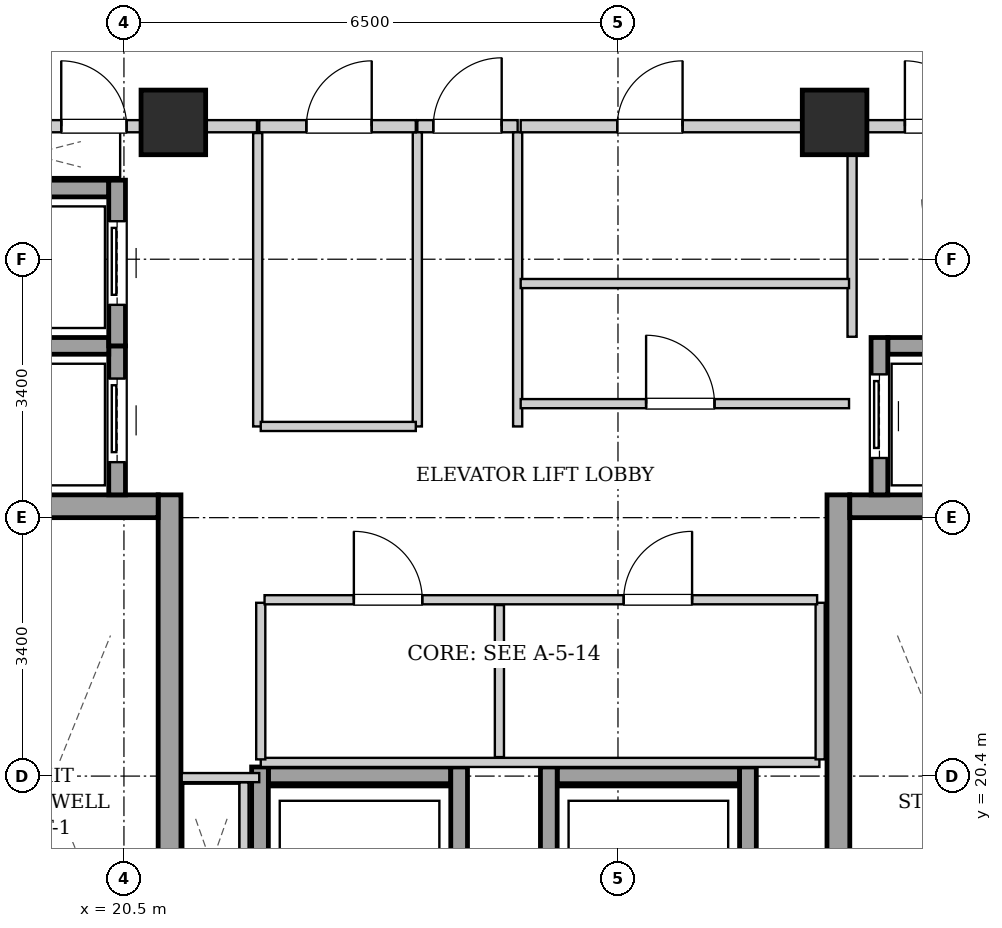
"""IFC4 building model, lengths in metres.
Left out: names, types, materials, properties, quantities, classifications, styles, units other than length and angle.
Written with IfcOpenShell. Run it as: python <this file> out.ifc"""

import sys

from ifc_helpers import new_model, si_unit, direction, frame, frame_2d, origin, origin_2d, place, context, subcontext, project, spatial, rectangle, extrude, element, fill, save


model = new_model("IFC4")
c1 = context("Model", 3, precision=1e-05, world=origin(), true_north=direction((0.0, 1.0)))
c2 = subcontext(c1, "Body", "Model", "MODEL_VIEW")
j1 = project(units=[si_unit("LENGTHUNIT", "METRE"), si_unit("PLANEANGLEUNIT", "RADIAN")], contexts=[c1])
p1 = place(None, origin())
s1 = spatial("IfcSite", under=j1, at=p1, CompositionType="ELEMENT")
p2 = place(p1, origin())
s2 = spatial("IfcBuilding", under=s1, at=p2, CompositionType="ELEMENT")
p3 = place(p2, frame((0.0, 0.0, 214.0)))
s3 = spatial("IfcBuildingStorey", under=s2, at=p3, CompositionType="ELEMENT", Elevation=214.0)
for number, where, z_axis, x_axis in (
    (1, (21.15, 29.0, 0.0), (0.0, 0.0, 1.0), (1.0, 0.0, 0.0)),
    (2, (29.85, 29.0, 0.0), (0.0, 0.0, 1.0), (1.0, 0.0, 0.0)),
):
    element("IfcColumn", number, at=place(p3, frame(where, z_axis=z_axis, x_axis=x_axis)), inside=s3, PredefinedType="COLUMN", context=c2, shape_type="SweptSolid", body=[
        extrude(rectangle(XDim=0.85, YDim=0.85, at=origin_2d()), origin(), (0.0, 0.0, 1.0), 3.3),
    ])
p4 = place(p3, frame((21.1, 15.1, 0.0), z_axis=(0.0, 0.0, 1.0), x_axis=(0.0, 1.0, 0.0)))
e3 = element("IfcWall", 3, at=p4, inside=s3, PredefinedType="SHEAR", context=c2, shape_type="SweptSolid", body=[
    extrude(rectangle(XDim=9.0, YDim=0.3, at=frame_2d((4.5, 0.0))), origin(), (0.0, 0.0, 1.0), 3.04),
])
p5 = place(p3, frame((18.1, 23.95, 0.0), z_axis=(0.0, 0.0, 1.0), x_axis=(1.0, 0.0, 0.0)))
e4 = element("IfcWall", 4, at=p5, inside=s3, PredefinedType="SHEAR", context=c2, shape_type="SweptSolid", body=[
    extrude(rectangle(XDim=2.85, YDim=0.3, at=frame_2d((1.425, 0.0))), origin(), (0.0, 0.0, 1.0), 3.04),
])
p6 = place(p3, frame((29.9, 15.1, 0.0), z_axis=(0.0, 0.0, 1.0), x_axis=(0.0, 1.0, 0.0)))
e5 = element("IfcWall", 5, at=p6, inside=s3, PredefinedType="SHEAR", context=c2, shape_type="SweptSolid", body=[
    extrude(rectangle(XDim=9.0, YDim=0.3, at=frame_2d((4.5, 0.0))), origin(), (0.0, 0.0, 1.0), 3.04),
])
p7 = place(p3, frame((30.05, 23.95, 0.0), z_axis=(0.0, 0.0, 1.0), x_axis=(1.0, 0.0, 0.0)))
e6 = element("IfcWall", 6, at=p7, inside=s3, PredefinedType="SHEAR", context=c2, shape_type="SweptSolid", body=[
    extrude(rectangle(XDim=2.85, YDim=0.3, at=frame_2d((1.425, 0.0))), origin(), (0.0, 0.0, 1.0), 3.04),
])
p8 = place(p3, frame((20.41, 24.1, 0.0), z_axis=(0.0, 0.0, 1.0), x_axis=(0.0, 1.0, 0.0)))
e7 = element("IfcWall", 7, at=p8, inside=s3, PredefinedType="SHEAR", context=c2, shape_type="SweptSolid", body=[
    extrude(rectangle(XDim=1.96, YDim=0.22, at=frame_2d((0.98, 0.0))), origin(), (0.0, 0.0, 1.0), 3.04),
])
p9 = place(p8, frame((0.43, 0.0, 0.0)))
e8 = element("IfcOpeningElement", 8, at=p9, cuts=e7, PredefinedType="OPENING", context=c2, shape_type="SweptSolid", body=[
    extrude(rectangle(XDim=1.1, YDim=2.15, at=frame_2d((0.55, 1.075))), frame((0.0, 0.12, 0.0), z_axis=(0.0, -1.0, 0.0), x_axis=(1.0, 0.0, 0.0)), (0.0, 0.0, 1.0), 0.24),
])
for number, where, z_axis, x_axis in (
    (9, (18.4, 26.06, 0.0), (0.0, 0.0, 1.0), (1.0, 0.0, 0.0)),
    (10, (18.4, 28.13, 0.0), (0.0, 0.0, 1.0), (1.0, 0.0, 0.0)),
):
    element("IfcWall", number, at=place(p3, frame(where, z_axis=z_axis, x_axis=x_axis)), inside=s3, PredefinedType="SHEAR", context=c2, shape_type="SweptSolid", body=[
        extrude(rectangle(XDim=1.9, YDim=0.22, at=frame_2d((0.95, 0.0))), origin(), (0.0, 0.0, 1.0), 3.04),
    ])
p10 = place(p3, frame((20.41, 26.06, 0.0), z_axis=(0.0, 0.0, 1.0), x_axis=(0.0, 1.0, 0.0)))
e11 = element("IfcWall", 11, at=p10, inside=s3, PredefinedType="SHEAR", context=c2, shape_type="SweptSolid", body=[
    extrude(rectangle(XDim=2.18, YDim=0.22, at=frame_2d((1.09, 0.0))), origin(), (0.0, 0.0, 1.0), 3.04),
])
p11 = place(p10, frame((0.54, 0.0, 0.0)))
e12 = element("IfcOpeningElement", 12, at=p11, cuts=e11, PredefinedType="OPENING", context=c2, shape_type="SweptSolid", body=[
    extrude(rectangle(XDim=1.1, YDim=2.15, at=frame_2d((0.55, 1.075))), frame((0.0, 0.12, 0.0), z_axis=(0.0, -1.0, 0.0), x_axis=(1.0, 0.0, 0.0)), (0.0, 0.0, 1.0), 0.24),
])
p12 = place(p3, frame((30.55, 26.06, 0.0), z_axis=(0.0, 0.0, 1.0), x_axis=(1.0, 0.0, 0.0)))
e13 = element("IfcWall", 13, at=p12, inside=s3, PredefinedType="SHEAR", context=c2, shape_type="SweptSolid", body=[
    extrude(rectangle(XDim=1.9, YDim=0.22, at=frame_2d((0.95, 0.0))), origin(), (0.0, 0.0, 1.0), 3.04),
])
p13 = place(p3, frame((30.44, 24.1, 0.0), z_axis=(0.0, 0.0, 1.0), x_axis=(0.0, 1.0, 0.0)))
e14 = element("IfcWall", 14, at=p13, inside=s3, PredefinedType="SHEAR", context=c2, shape_type="SweptSolid", body=[
    extrude(rectangle(XDim=2.07, YDim=0.22, at=frame_2d((1.035, 0.0))), origin(), (0.0, 0.0, 1.0), 3.04),
])
p14 = place(p13, frame((0.485, 0.0, 0.0)))
e15 = element("IfcOpeningElement", 15, at=p14, cuts=e14, PredefinedType="OPENING", context=c2, shape_type="SweptSolid", body=[
    extrude(rectangle(XDim=1.1, YDim=2.15, at=frame_2d((0.55, 1.075))), frame((0.0, 0.12, 0.0), z_axis=(0.0, -1.0, 0.0), x_axis=(1.0, 0.0, 0.0)), (0.0, 0.0, 1.0), 0.24),
])
p15 = place(p3, frame((22.4, 20.41, 0.0), z_axis=(0.0, 0.0, 1.0), x_axis=(1.0, 0.0, 0.0)))
e16 = element("IfcWall", 16, at=p15, inside=s3, PredefinedType="SHEAR", context=c2, shape_type="SweptSolid", body=[
    extrude(rectangle(XDim=2.4, YDim=0.22, at=frame_2d((1.2, 0.0))), origin(), (0.0, 0.0, 1.0), 3.04),
])
for number, where, z_axis, x_axis in (
    (17, (22.29, 17.98, 0.0), (0.0, 0.0, 1.0), (0.0, 1.0, 0.0)),
    (18, (24.91, 17.98, 0.0), (0.0, 0.0, 1.0), (0.0, 1.0, 0.0)),
):
    element("IfcWall", number, at=place(p3, frame(where, z_axis=z_axis, x_axis=x_axis)), inside=s3, PredefinedType="SHEAR", context=c2, shape_type="SweptSolid", body=[
        extrude(rectangle(XDim=2.54, YDim=0.22, at=frame_2d((1.27, 0.0))), origin(), (0.0, 0.0, 1.0), 3.04),
    ])
p16 = place(p3, frame((26.2, 20.41, 0.0), z_axis=(0.0, 0.0, 1.0), x_axis=(1.0, 0.0, 0.0)))
e19 = element("IfcWall", 19, at=p16, inside=s3, PredefinedType="SHEAR", context=c2, shape_type="SweptSolid", body=[
    extrude(rectangle(XDim=2.4, YDim=0.22, at=frame_2d((1.2, 0.0))), origin(), (0.0, 0.0, 1.0), 3.04),
])
for number, where, z_axis, x_axis in (
    (20, (26.09, 17.98, 0.0), (0.0, 0.0, 1.0), (0.0, 1.0, 0.0)),
    (21, (28.71, 17.98, 0.0), (0.0, 0.0, 1.0), (0.0, 1.0, 0.0)),
):
    element("IfcWall", number, at=place(p3, frame(where, z_axis=z_axis, x_axis=x_axis)), inside=s3, PredefinedType="SHEAR", context=c2, shape_type="SweptSolid", body=[
        extrude(rectangle(XDim=2.54, YDim=0.22, at=frame_2d((1.27, 0.0))), origin(), (0.0, 0.0, 1.0), 3.04),
    ])
p17 = place(p3, frame((24.36, 28.95, 0.0), z_axis=(0.0, 0.0, 1.0), x_axis=(1.0, 0.0, 0.0)))
e22 = element("IfcWall", 22, at=p17, inside=s3, PredefinedType="PARTITIONING", context=c2, shape_type="SweptSolid", body=[
    extrude(rectangle(XDim=1.32, YDim=0.16, at=frame_2d((0.66, 0.0))), origin(), (0.0, 0.0, 1.0), 2.556),
])
p18 = place(p17, frame((0.21, 0.0, 0.0)))
e23 = element("IfcOpeningElement", 23, at=p18, cuts=e22, PredefinedType="OPENING", context=c2, shape_type="SweptSolid", body=[
    extrude(rectangle(XDim=0.9, YDim=2.05, at=frame_2d((0.45, 1.025))), frame((0.0, 0.09, 0.0), z_axis=(0.0, -1.0, 0.0), x_axis=(1.0, 0.0, 0.0)), (0.0, 0.0, 1.0), 0.18),
])
p19 = place(p3, frame((17.96, 28.95, 0.0), z_axis=(0.0, 0.0, 1.0), x_axis=(1.0, 0.0, 0.0)))
e24 = element("IfcWall", 24, at=p19, inside=s3, PredefinedType="PARTITIONING", context=c2, shape_type="SweptSolid", body=[
    extrude(rectangle(XDim=4.29, YDim=0.16, at=frame_2d((2.145, 0.0))), origin(), (0.0, 0.0, 1.0), 2.556),
])
p20 = place(p19, frame((1.715, 0.0, 0.0)))
e25 = element("IfcOpeningElement", 25, at=p20, cuts=e24, PredefinedType="OPENING", context=c2, shape_type="SweptSolid", body=[
    extrude(rectangle(XDim=0.86, YDim=2.05, at=frame_2d((0.43, 1.025))), frame((0.0, 0.09, 0.0), z_axis=(0.0, -1.0, 0.0), x_axis=(1.0, 0.0, 0.0)), (0.0, 0.0, 1.0), 0.18),
])
p21 = place(p3, frame((22.08, 18.2, 0.0), z_axis=(0.0, 0.0, 1.0), x_axis=(0.0, 1.0, 0.0)))
e26 = element("IfcWall", 26, at=p21, inside=s3, PredefinedType="PARTITIONING", context=c2, shape_type="SweptSolid", body=[
    extrude(rectangle(XDim=2.12, YDim=0.12, at=frame_2d((1.06, 0.0))), origin(), (0.0, 0.0, 1.0), 3.04),
])
p22 = place(p3, frame((22.28, 20.38, 0.0), z_axis=(0.0, 0.0, 1.0), x_axis=(-1.0, 0.0, 0.0)))
e27 = element("IfcWall", 27, at=p22, inside=s3, PredefinedType="PARTITIONING", context=c2, shape_type="SweptSolid", body=[
    extrude(rectangle(XDim=1.02, YDim=0.12, at=frame_2d((0.51, 0.0))), origin(), (0.0, 0.0, 1.0), 3.04),
])
for number, where, z_axis, x_axis in (
    (28, (24.36, 25.0, 0.0), (0.0, 0.0, 1.0), (0.0, 1.0, 0.0)),
    (29, (25.68, 25.0, 0.0), (0.0, 0.0, 1.0), (0.0, 1.0, 0.0)),
):
    element("IfcWall", number, at=place(p3, frame(where, z_axis=z_axis, x_axis=x_axis)), inside=s3, PredefinedType="PARTITIONING", context=c2, shape_type="SweptSolid", body=[
        extrude(rectangle(XDim=3.87, YDim=0.12, at=frame_2d((1.935, 0.0))), origin(), (0.0, 0.0, 1.0), 3.04),
    ])
p23 = place(p3, frame((30.08, 26.18, 0.0), z_axis=(0.0, 0.0, 1.0), x_axis=(0.0, 1.0, 0.0)))
e30 = element("IfcWall", 30, at=p23, inside=s3, PredefinedType="PARTITIONING", context=c2, shape_type="SweptSolid", body=[
    extrude(rectangle(XDim=2.68, YDim=0.12, at=frame_2d((1.34, 0.0))), origin(), (0.0, 0.0, 1.0), 3.04),
])
p24 = place(p3, frame((30.08, 28.95, 0.0), z_axis=(0.0, 0.0, 1.0), x_axis=(1.0, 0.0, 0.0)))
e31 = element("IfcWall", 31, at=p24, inside=s3, PredefinedType="PARTITIONING", context=c2, shape_type="SweptSolid", body=[
    extrude(rectangle(XDim=2.96, YDim=0.16, at=frame_2d((1.48, 0.0))), origin(), (0.0, 0.0, 1.0), 3.04),
])
p25 = place(p24, frame((0.695, 0.0, 0.0)))
e32 = element("IfcOpeningElement", 32, at=p25, cuts=e31, PredefinedType="OPENING", context=c2, shape_type="SweptSolid", body=[
    extrude(rectangle(XDim=0.86, YDim=2.05, at=frame_2d((0.43, 1.025))), frame((0.0, 0.09, 0.0), z_axis=(0.0, -1.0, 0.0), x_axis=(1.0, 0.0, 0.0)), (0.0, 0.0, 1.0), 0.18),
])
p26 = place(p3, frame((22.26, 25.0, 0.0), z_axis=(0.0, 0.0, 1.0), x_axis=(0.0, 1.0, 0.0)))
e33 = element("IfcWall", 33, at=p26, inside=s3, PredefinedType="PARTITIONING", context=c2, shape_type="SweptSolid", body=[
    extrude(rectangle(XDim=3.86, YDim=0.12, at=frame_2d((1.93, 0.0))), origin(), (0.0, 0.0, 1.0), 3.04),
])
p27 = place(p3, frame((22.3, 25.0, 0.0), z_axis=(0.0, 0.0, 1.0), x_axis=(1.0, 0.0, 0.0)))
e34 = element("IfcWall", 34, at=p27, inside=s3, PredefinedType="PARTITIONING", context=c2, shape_type="SweptSolid", body=[
    extrude(rectangle(XDim=2.04, YDim=0.12, at=frame_2d((1.02, 0.0))), origin(), (0.0, 0.0, 1.0), 3.04),
])
p28 = place(p3, frame((22.28, 28.95, 0.0), z_axis=(0.0, 0.0, 1.0), x_axis=(1.0, 0.0, 0.0)))
e35 = element("IfcWall", 35, at=p28, inside=s3, PredefinedType="PARTITIONING", context=c2, shape_type="SweptSolid", body=[
    extrude(rectangle(XDim=2.06, YDim=0.16, at=frame_2d((1.03, 0.0))), origin(), (0.0, 0.0, 1.0), 2.556),
])
p29 = place(p28, frame((0.62, 0.0, 0.0)))
e36 = element("IfcOpeningElement", 36, at=p29, cuts=e35, PredefinedType="OPENING", context=c2, shape_type="SweptSolid", body=[
    extrude(rectangle(XDim=0.86, YDim=2.05, at=frame_2d((0.43, 1.025))), frame((0.0, 0.09, 0.0), z_axis=(0.0, -1.0, 0.0), x_axis=(1.0, 0.0, 0.0)), (0.0, 0.0, 1.0), 0.18),
])
p30 = place(p3, frame((25.72, 26.88, 0.0), z_axis=(0.0, 0.0, 1.0), x_axis=(1.0, 0.0, 0.0)))
e37 = element("IfcWall", 37, at=p30, inside=s3, PredefinedType="PARTITIONING", context=c2, shape_type="SweptSolid", body=[
    extrude(rectangle(XDim=4.32, YDim=0.12, at=frame_2d((2.16, 0.0))), origin(), (0.0, 0.0, 1.0), 3.04),
])
p31 = place(p3, frame((25.72, 25.3, 0.0), z_axis=(0.0, 0.0, 1.0), x_axis=(1.0, 0.0, 0.0)))
e38 = element("IfcWall", 38, at=p31, inside=s3, PredefinedType="PARTITIONING", context=c2, shape_type="SweptSolid", body=[
    extrude(rectangle(XDim=4.32, YDim=0.12, at=frame_2d((2.16, 0.0))), origin(), (0.0, 0.0, 1.0), 3.04),
])
p32 = place(p31, frame((1.65, 0.0, 0.0)))
e39 = element("IfcOpeningElement", 39, at=p32, cuts=e38, PredefinedType="OPENING", context=c2, shape_type="SweptSolid", body=[
    extrude(rectangle(XDim=0.9, YDim=2.05, at=frame_2d((0.45, 1.025))), frame((0.0, 0.07, 0.0), z_axis=(0.0, -1.0, 0.0), x_axis=(1.0, 0.0, 0.0)), (0.0, 0.0, 1.0), 0.14),
])
p33 = place(p3, frame((25.72, 28.95, 0.0), z_axis=(0.0, 0.0, 1.0), x_axis=(1.0, 0.0, 0.0)))
e40 = element("IfcWall", 40, at=p33, inside=s3, PredefinedType="PARTITIONING", context=c2, shape_type="SweptSolid", body=[
    extrude(rectangle(XDim=4.32, YDim=0.16, at=frame_2d((2.16, 0.0))), origin(), (0.0, 0.0, 1.0), 2.556),
])
p34 = place(p33, frame((1.27, 0.0, 0.0)))
e41 = element("IfcOpeningElement", 41, at=p34, cuts=e40, PredefinedType="OPENING", context=c2, shape_type="SweptSolid", body=[
    extrude(rectangle(XDim=0.86, YDim=2.05, at=frame_2d((0.43, 1.025))), frame((0.0, 0.09, 0.0), z_axis=(0.0, -1.0, 0.0), x_axis=(1.0, 0.0, 0.0)), (0.0, 0.0, 1.0), 0.18),
])
p35 = place(p3, frame((22.3, 20.58, 0.0), z_axis=(0.0, 0.0, 1.0), x_axis=(1.0, 0.0, 0.0)))
e42 = element("IfcWall", 42, at=p35, inside=s3, PredefinedType="PARTITIONING", context=c2, shape_type="SweptSolid", body=[
    extrude(rectangle(XDim=7.35, YDim=0.12, at=frame_2d((3.675, 0.0))), origin(), (0.0, 0.0, 1.0), 3.04),
])
for number, where, z_axis, x_axis in (
    (43, (22.3, 20.62, 0.0), (0.0, 0.0, 1.0), (0.0, 1.0, 0.0)),
    (44, (29.66, 20.62, 0.0), (0.0, 0.0, 1.0), (0.0, 1.0, 0.0)),
):
    element("IfcWall", number, at=place(p3, frame(where, z_axis=z_axis, x_axis=x_axis)), inside=s3, PredefinedType="PARTITIONING", context=c2, shape_type="SweptSolid", body=[
        extrude(rectangle(XDim=2.06, YDim=0.12, at=frame_2d((1.03, 0.0))), origin(), (0.0, 0.0, 1.0), 3.04),
    ])
p36 = place(p3, frame((25.44, 20.65, 0.0), z_axis=(0.0, 0.0, 1.0), x_axis=(0.0, 1.0, 0.0)))
e45 = element("IfcWall", 45, at=p36, inside=s3, PredefinedType="PARTITIONING", context=c2, shape_type="SweptSolid", body=[
    extrude(rectangle(XDim=2.0, YDim=0.12, at=frame_2d((1.0, 0.0))), origin(), (0.0, 0.0, 1.0), 3.04),
])
p37 = place(p3, frame((22.35, 22.72, 0.0), z_axis=(0.0, 0.0, 1.0), x_axis=(1.0, 0.0, 0.0)))
e46 = element("IfcWall", 46, at=p37, inside=s3, PredefinedType="PARTITIONING", context=c2, shape_type="SweptSolid", body=[
    extrude(rectangle(XDim=7.27, YDim=0.12, at=frame_2d((3.635, 0.0))), origin(), (0.0, 0.0, 1.0), 3.04),
])
p38 = place(p37, frame((1.175, 0.0, 0.0)))
e47 = element("IfcOpeningElement", 47, at=p38, cuts=e46, PredefinedType="OPENING", context=c2, shape_type="SweptSolid", body=[
    extrude(rectangle(XDim=0.9, YDim=2.05, at=frame_2d((0.45, 1.025))), frame((0.0, 0.07, 0.0), z_axis=(0.0, -1.0, 0.0), x_axis=(1.0, 0.0, 0.0)), (0.0, 0.0, 1.0), 0.14),
])
p39 = place(p37, frame((4.725, 0.0, 0.0)))
e48 = element("IfcOpeningElement", 48, at=p39, cuts=e46, PredefinedType="OPENING", context=c2, shape_type="SweptSolid", body=[
    extrude(rectangle(XDim=0.9, YDim=2.05, at=frame_2d((0.45, 1.025))), frame((0.0, 0.07, 0.0), z_axis=(0.0, -1.0, 0.0), x_axis=(1.0, 0.0, 0.0)), (0.0, 0.0, 1.0), 0.14),
])
p40 = place(p9, origin())
e49 = element("IfcDoor", 49, at=p40, inside=s3, OperationType="SLIDING_TO_LEFT", PredefinedType="DOOR", context=c2, shape_type="SweptSolid", body=[
    extrude(rectangle(XDim=1.1, YDim=2.15, at=frame_2d((0.55, 1.075))), frame((0.0, 0.025, 0.0), z_axis=(0.0, -1.0, 0.0), x_axis=(1.0, 0.0, 0.0)), (0.0, 0.0, 1.0), 0.05),
])
fill(e8, e49)
p41 = place(p11, origin())
e50 = element("IfcDoor", 50, at=p41, inside=s3, OperationType="SLIDING_TO_LEFT", PredefinedType="DOOR", context=c2, shape_type="SweptSolid", body=[
    extrude(rectangle(XDim=1.1, YDim=2.15, at=frame_2d((0.55, 1.075))), frame((0.0, 0.025, 0.0), z_axis=(0.0, -1.0, 0.0), x_axis=(1.0, 0.0, 0.0)), (0.0, 0.0, 1.0), 0.05),
])
fill(e12, e50)
p42 = place(p14, origin())
e51 = element("IfcDoor", 51, at=p42, inside=s3, OperationType="SLIDING_TO_LEFT", PredefinedType="DOOR", context=c2, shape_type="SweptSolid", body=[
    extrude(rectangle(XDim=1.1, YDim=2.15, at=frame_2d((0.55, 1.075))), frame((0.0, 0.025, 0.0), z_axis=(0.0, -1.0, 0.0), x_axis=(1.0, 0.0, 0.0)), (0.0, 0.0, 1.0), 0.05),
])
fill(e15, e51)
p43 = place(p18, origin())
e52 = element("IfcDoor", 52, at=p43, inside=s3, OperationType="SINGLE_SWING_RIGHT", PredefinedType="DOOR", context=c2, shape_type="SweptSolid", body=[
    extrude(rectangle(XDim=0.9, YDim=2.05, at=frame_2d((0.45, 1.025))), frame((0.0, 0.025, 0.0), z_axis=(0.0, -1.0, 0.0), x_axis=(1.0, 0.0, 0.0)), (0.0, 0.0, 1.0), 0.05),
])
fill(e23, e52)
p44 = place(p20, origin())
e53 = element("IfcDoor", 53, at=p44, inside=s3, OperationType="SINGLE_SWING_LEFT", PredefinedType="DOOR", context=c2, shape_type="SweptSolid", body=[
    extrude(rectangle(XDim=0.86, YDim=2.05, at=frame_2d((0.43, 1.025))), frame((0.0, 0.025, 0.0), z_axis=(0.0, -1.0, 0.0), x_axis=(1.0, 0.0, 0.0)), (0.0, 0.0, 1.0), 0.05),
])
fill(e25, e53)
p45 = place(p25, origin())
e54 = element("IfcDoor", 54, at=p45, inside=s3, OperationType="SINGLE_SWING_LEFT", PredefinedType="DOOR", context=c2, shape_type="SweptSolid", body=[
    extrude(rectangle(XDim=0.86, YDim=2.05, at=frame_2d((0.43, 1.025))), frame((0.0, 0.025, 0.0), z_axis=(0.0, -1.0, 0.0), x_axis=(1.0, 0.0, 0.0)), (0.0, 0.0, 1.0), 0.05),
])
fill(e32, e54)
p46 = place(p29, origin())
e55 = element("IfcDoor", 55, at=p46, inside=s3, OperationType="SINGLE_SWING_RIGHT", PredefinedType="DOOR", context=c2, shape_type="SweptSolid", body=[
    extrude(rectangle(XDim=0.86, YDim=2.05, at=frame_2d((0.43, 1.025))), frame((0.0, 0.025, 0.0), z_axis=(0.0, -1.0, 0.0), x_axis=(1.0, 0.0, 0.0)), (0.0, 0.0, 1.0), 0.05),
])
fill(e36, e55)
p47 = place(p32, origin())
e56 = element("IfcDoor", 56, at=p47, inside=s3, OperationType="SINGLE_SWING_LEFT", PredefinedType="DOOR", context=c2, shape_type="SweptSolid", body=[
    extrude(rectangle(XDim=0.9, YDim=2.05, at=frame_2d((0.45, 1.025))), frame((0.0, 0.025, 0.0), z_axis=(0.0, -1.0, 0.0), x_axis=(1.0, 0.0, 0.0)), (0.0, 0.0, 1.0), 0.05),
])
fill(e39, e56)
p48 = place(p34, origin())
e57 = element("IfcDoor", 57, at=p48, inside=s3, OperationType="SINGLE_SWING_RIGHT", PredefinedType="DOOR", context=c2, shape_type="SweptSolid", body=[
    extrude(rectangle(XDim=0.86, YDim=2.05, at=frame_2d((0.43, 1.025))), frame((0.0, 0.025, 0.0), z_axis=(0.0, -1.0, 0.0), x_axis=(1.0, 0.0, 0.0)), (0.0, 0.0, 1.0), 0.05),
])
fill(e41, e57)
p49 = place(p38, origin())
e58 = element("IfcDoor", 58, at=p49, inside=s3, OperationType="SINGLE_SWING_LEFT", PredefinedType="DOOR", context=c2, shape_type="SweptSolid", body=[
    extrude(rectangle(XDim=0.9, YDim=2.05, at=frame_2d((0.45, 1.025))), frame((0.0, 0.025, 0.0), z_axis=(0.0, -1.0, 0.0), x_axis=(1.0, 0.0, 0.0)), (0.0, 0.0, 1.0), 0.05),
])
fill(e47, e58)
p50 = place(p39, origin())
e59 = element("IfcDoor", 59, at=p50, inside=s3, OperationType="SINGLE_SWING_RIGHT", PredefinedType="DOOR", context=c2, shape_type="SweptSolid", body=[
    extrude(rectangle(XDim=0.9, YDim=2.05, at=frame_2d((0.45, 1.025))), frame((0.0, 0.025, 0.0), z_axis=(0.0, -1.0, 0.0), x_axis=(1.0, 0.0, 0.0)), (0.0, 0.0, 1.0), 0.05),
])
fill(e48, e59)
save(model, sys.argv[1])
